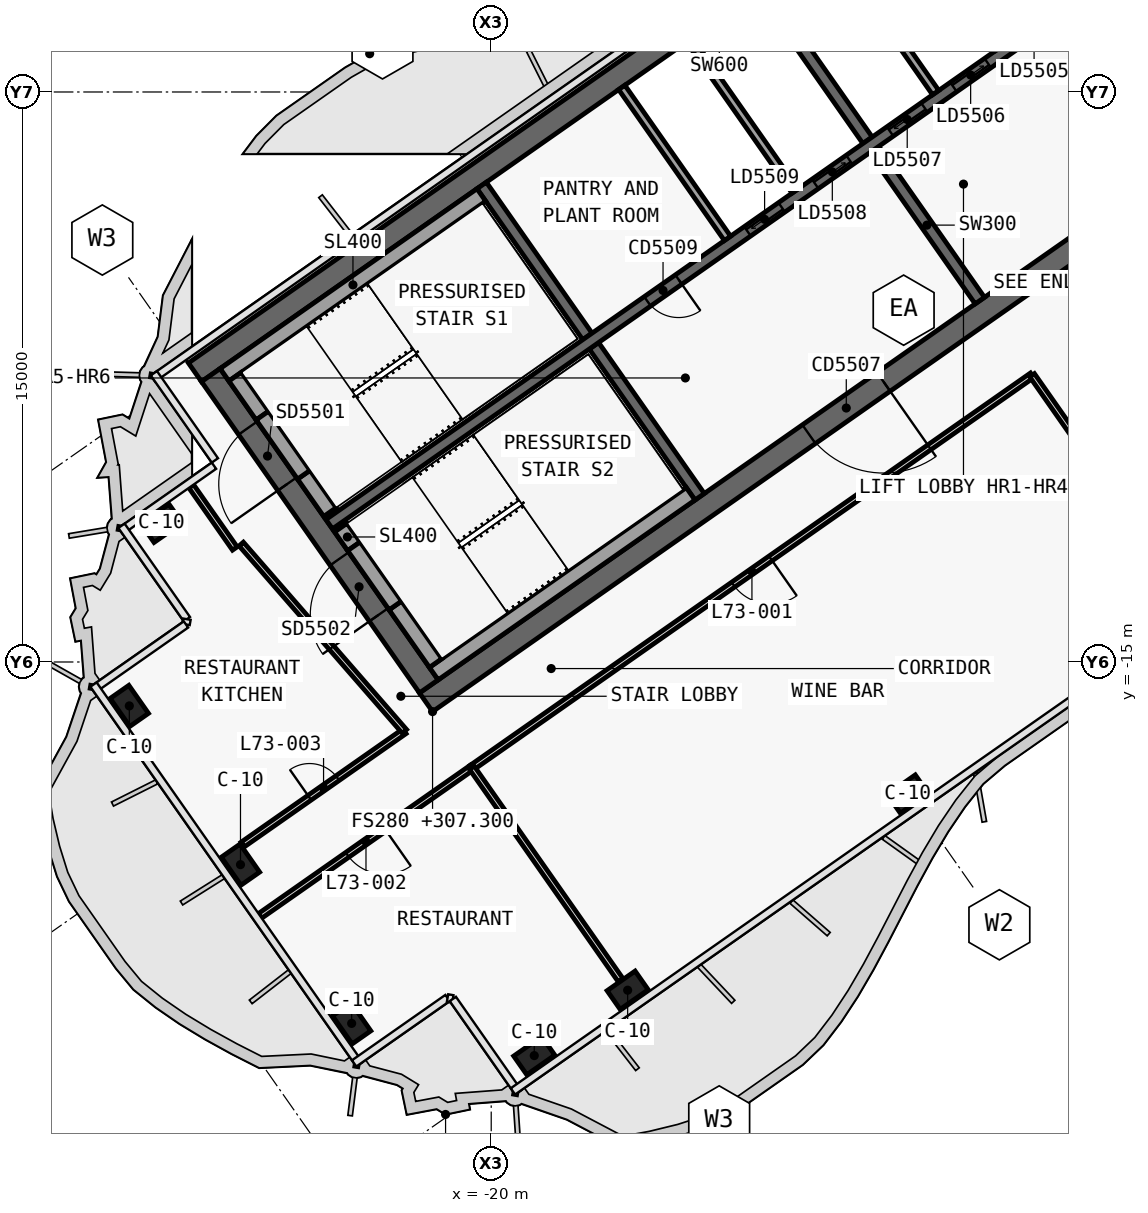
"""IFC4 building model, lengths in metres.
Left out: names, types, materials, properties, quantities, classifications, styles, units other than length and angle.
Written with IfcOpenShell. Run it as: python <this file> out.ifc"""

import sys

from ifc_helpers import new_model, si_unit, direction, frame, frame_2d, origin, origin_2d, place, context, subcontext, project, spatial, polyline, rectangle, outline, extrude, element, fill, save


model = new_model("IFC4")
c1 = context("Model", 3, precision=1e-05, world=origin(), true_north=direction((0.0, 1.0)))
c2 = subcontext(c1, "Body", "Model", "MODEL_VIEW")
j1 = project(units=[si_unit("LENGTHUNIT", "METRE"), si_unit("PLANEANGLEUNIT", "RADIAN")], contexts=[c1])
p1 = place(None, origin())
s1 = spatial("IfcSite", under=j1, at=p1, CompositionType="ELEMENT")
p2 = place(p1, origin())
s2 = spatial("IfcBuilding", under=s1, at=p2, CompositionType="ELEMENT")
p3 = place(p2, frame((0.0, 0.0, 307.3)))
s3 = spatial("IfcBuildingStorey", under=s2, at=p3, CompositionType="ELEMENT", Elevation=307.3)
p4 = place(p3, frame((-0.028, 12.066, 0.0), z_axis=(0.0, 0.0, 1.0), x_axis=(-0.819151382952, -0.573577380837, 0.0)))
e1 = element("IfcWall", 1, at=p4, inside=s3, PredefinedType="SHEAR", context=c2, shape_type="SweptSolid", body=[
    extrude(outline(polyline([(33.898, 0.3), (0.42, 0.3), (0.0, -0.3), (33.898, -0.3), (33.898, 0.3)])), origin(), (0.0, 0.0, 1.0), 6.0),
])
p5 = place(p3, frame((-0.028, -0.874, 0.0), z_axis=(0.0, 0.0, 1.0), x_axis=(-0.819150035022, -0.573579305871, 0.0)))
e2 = element("IfcWall", 2, at=p5, inside=s3, PredefinedType="SHEAR", context=c2, shape_type="SweptSolid", body=[
    extrude(outline(polyline([(26.476, 0.3), (0.42, 0.3), (0.0, -0.3), (26.476, -0.3), (26.476, 0.3)])), origin(), (0.0, 0.0, 1.0), 6.0),
])
p6 = place(p5, frame((2.976, 0.0, 0.0)))
e3 = element("IfcOpeningElement", 3, at=p6, cuts=e2, PredefinedType="OPENING", context=c2, shape_type="SweptSolid", body=[
    extrude(rectangle(XDim=2.4, YDim=2.1, at=frame_2d((1.2, 1.05))), frame((0.0, 0.31, 0.0), z_axis=(0.0, -1.0, 0.0), x_axis=(1.0, 0.0, 0.0)), (0.0, 0.0, 1.0), 0.62),
])
p7 = place(p5, frame((11.776, 0.0, 0.0)))
e4 = element("IfcOpeningElement", 4, at=p7, cuts=e2, PredefinedType="OPENING", context=c2, shape_type="SweptSolid", body=[
    extrude(rectangle(XDim=2.4, YDim=2.1, at=frame_2d((1.2, 1.05))), frame((0.0, 0.31, 0.0), z_axis=(0.0, -1.0, 0.0), x_axis=(1.0, 0.0, 0.0)), (0.0, 0.0, 1.0), 0.62),
])
p8 = place(p3, frame((-21.642, -15.642, 0.0), z_axis=(0.0, 0.0, 1.0), x_axis=(-0.573586866468, 0.819144740944, 0.0)))
e5 = element("IfcWall", 5, at=p8, inside=s3, PredefinedType="SHEAR", context=c2, shape_type="SweptSolid", body=[
    extrude(outline(polyline([(0.0, 0.3), (0.0, -0.3), (10.0, -0.3), (10.0, 0.3), (0.0, 0.3)])), origin(), (0.0, 0.0, 1.0), 6.0),
])
p9 = place(p8, frame((6.5, 0.0, 0.0)))
e6 = element("IfcOpeningElement", 6, at=p9, cuts=e5, PredefinedType="OPENING", context=c2, shape_type="SweptSolid", body=[
    extrude(rectangle(XDim=1.8, YDim=2.1, at=frame_2d((0.9, 1.05))), frame((0.0, 0.31, 0.0), z_axis=(0.0, -1.0, 0.0), x_axis=(1.0, 0.0, 0.0)), (0.0, 0.0, 1.0), 0.62),
])
p10 = place(p8, frame((2.3, 0.0, 0.0)))
e7 = element("IfcOpeningElement", 7, at=p10, cuts=e5, PredefinedType="OPENING", context=c2, shape_type="SweptSolid", body=[
    extrude(rectangle(XDim=1.8, YDim=2.1, at=frame_2d((0.9, 1.05))), frame((0.0, 0.31, 0.0), z_axis=(0.0, -1.0, 0.0), x_axis=(1.0, 0.0, 0.0)), (0.0, 0.0, 1.0), 0.62),
])
p11 = place(p3, frame((-7.143, -5.49, 0.0), z_axis=(0.0, 0.0, 1.0), x_axis=(-0.573617744349, 0.819123118565, 0.0)))
e8 = element("IfcWall", 8, at=p11, inside=s3, PredefinedType="SHEAR", context=c2, shape_type="SweptSolid", body=[
    extrude(outline(polyline([(4.85, 0.15), (0.0, 0.15), (0.0, -0.15), (4.85, -0.15), (4.85, 0.15)])), origin(), (0.0, 0.0, 1.0), 6.0),
])
p12 = place(p3, frame((-10.097, -1.271, 0.0), z_axis=(0.0, 0.0, 1.0), x_axis=(-0.573560315113, 0.819163332265, 0.0)))
e9 = element("IfcWall", 9, at=p12, inside=s3, PredefinedType="SHEAR", context=c2, shape_type="SweptSolid", body=[
    extrude(outline(polyline([(4.85, -0.15), (4.85, 0.15), (0.0, 0.15), (0.0, -0.15), (4.85, -0.15)])), origin(), (0.0, 0.0, 1.0), 6.0),
])
p13 = place(p3, frame((-14.515, -10.652, 0.0), z_axis=(0.0, 0.0, 1.0), x_axis=(-0.573560315113, 0.819163332265, 0.0)))
e10 = element("IfcWall", 10, at=p13, inside=s3, PredefinedType="SHEAR", context=c2, shape_type="SweptSolid", body=[
    extrude(outline(polyline([(4.85, 0.15), (0.0, 0.15), (0.0, -0.15), (4.85, -0.15), (4.85, 0.15)])), origin(), (0.0, 0.0, 1.0), 6.0),
])
p14 = place(p3, frame((-17.469, -6.433, 0.0), z_axis=(0.0, 0.0, 1.0), x_axis=(-0.573594092424, 0.81913968109, 0.0)))
e11 = element("IfcWall", 11, at=p14, inside=s3, PredefinedType="SHEAR", context=c2, shape_type="SweptSolid", body=[
    extrude(outline(polyline([(4.85, -0.15), (4.85, 0.15), (0.0, 0.15), (0.0, -0.15), (4.85, -0.15)])), origin(), (0.0, 0.0, 1.0), 6.0),
])
p15 = place(p3, frame((-2.638, 3.768, 0.0), z_axis=(0.0, 0.0, 1.0), x_axis=(-0.819155014212, -0.573572194837, 0.0)))
e12 = element("IfcWall", 12, at=p15, inside=s3, PredefinedType="SHEAR", context=c2, shape_type="SweptSolid", body=[
    extrude(outline(polyline([(26.4, 0.15), (0.0, 0.15), (0.0, -0.15), (26.4, -0.15), (26.4, 0.15)])), origin(), (0.0, 0.0, 1.0), 6.0),
])
p16 = place(p15, frame((1.169, 0.0, 0.0)))
e13 = element("IfcOpeningElement", 13, at=p16, cuts=e12, PredefinedType="OPENING", context=c2, shape_type="SweptSolid", body=[
    extrude(rectangle(XDim=1.1, YDim=2.1, at=frame_2d((0.55, 1.05))), frame((0.0, 0.16, 0.0), z_axis=(0.0, -1.0, 0.0), x_axis=(1.0, 0.0, 0.0)), (0.0, 0.0, 1.0), 0.32),
])
p17 = place(p15, frame((3.206, 0.0, 0.0)))
e14 = element("IfcOpeningElement", 14, at=p17, cuts=e12, PredefinedType="OPENING", context=c2, shape_type="SweptSolid", body=[
    extrude(rectangle(XDim=1.1, YDim=2.1, at=frame_2d((0.55, 1.05))), frame((0.0, 0.16, 0.0), z_axis=(0.0, -1.0, 0.0), x_axis=(1.0, 0.0, 0.0)), (0.0, 0.0, 1.0), 0.32),
])
p18 = place(p15, frame((5.244, 0.0, 0.0)))
e15 = element("IfcOpeningElement", 15, at=p18, cuts=e12, PredefinedType="OPENING", context=c2, shape_type="SweptSolid", body=[
    extrude(rectangle(XDim=1.1, YDim=2.1, at=frame_2d((0.55, 1.05))), frame((0.0, 0.16, 0.0), z_axis=(0.0, -1.0, 0.0), x_axis=(1.0, 0.0, 0.0)), (0.0, 0.0, 1.0), 0.32),
])
p19 = place(p15, frame((7.281, 0.0, 0.0)))
e16 = element("IfcOpeningElement", 16, at=p19, cuts=e12, PredefinedType="OPENING", context=c2, shape_type="SweptSolid", body=[
    extrude(rectangle(XDim=1.1, YDim=2.1, at=frame_2d((0.55, 1.05))), frame((0.0, 0.16, 0.0), z_axis=(0.0, -1.0, 0.0), x_axis=(1.0, 0.0, 0.0)), (0.0, 0.0, 1.0), 0.32),
])
p20 = place(p15, frame((9.688, 0.0, 0.0)))
e17 = element("IfcOpeningElement", 17, at=p20, cuts=e12, PredefinedType="OPENING", context=c2, shape_type="SweptSolid", body=[
    extrude(rectangle(XDim=1.1, YDim=2.1, at=frame_2d((0.55, 1.05))), frame((0.0, 0.16, 0.0), z_axis=(0.0, -1.0, 0.0), x_axis=(1.0, 0.0, 0.0)), (0.0, 0.0, 1.0), 0.32),
])
p21 = place(p15, frame((11.863, 0.0, 0.0)))
e18 = element("IfcOpeningElement", 18, at=p21, cuts=e12, PredefinedType="OPENING", context=c2, shape_type="SweptSolid", body=[
    extrude(rectangle(XDim=1.1, YDim=2.1, at=frame_2d((0.55, 1.05))), frame((0.0, 0.16, 0.0), z_axis=(0.0, -1.0, 0.0), x_axis=(1.0, 0.0, 0.0)), (0.0, 0.0, 1.0), 0.32),
])
p22 = place(p15, frame((15.175, 0.0, 0.0)))
e19 = element("IfcOpeningElement", 19, at=p22, cuts=e12, PredefinedType="OPENING", context=c2, shape_type="SweptSolid", body=[
    extrude(rectangle(XDim=1.0, YDim=2.1, at=frame_2d((0.5, 1.05))), frame((0.0, 0.16, 0.0), z_axis=(0.0, -1.0, 0.0), x_axis=(1.0, 0.0, 0.0)), (0.0, 0.0, 1.0), 0.32),
])
for number, where, z_axis, x_axis in (
    (20, (-9.038, -18.475, 0.0), (0.0, 0.0, 1.0), (-0.819, -0.574, 0.0)),
    (21, (-16.41, -23.637, 0.0), (0.0, 0.0, 1.0), (-0.819, -0.574, 0.0)),
    (22, (-18.867, -25.358, 0.0), (0.0, 0.0, 1.0), (-0.819, -0.574, 0.0)),
    (23, (-28.676, -11.35, 0.0), (0.0, 0.0, 1.0), (-0.819, -0.574, 0.0)),
    (24, (-23.672, -24.51, 0.0), (0.0, 0.0, 1.0), (-0.574, 0.819, 0.0)),
    (25, (-26.598, -20.333, 0.0), (0.0, 0.0, 1.0), (-0.574, 0.819, 0.0)),
    (26, (-29.523, -16.155, 0.0), (0.0, 0.0, 1.0), (-0.574, 0.819, 0.0)),
):
    element("IfcColumn", number, at=place(p3, frame(where, z_axis=z_axis, x_axis=x_axis)), inside=s3, PredefinedType="COLUMN", context=c2, shape_type="SweptSolid", body=[
        extrude(rectangle(XDim=0.9, YDim=0.6, at=origin_2d()), origin(), (0.0, 0.0, 1.0), 6.0),
    ])
p23 = place(p3, frame((-8.305, -0.017, 0.0), z_axis=(0.0, 0.0, 1.0), x_axis=(-0.573594092424, 0.81913968109, 0.0)))
e27 = element("IfcWall", 27, at=p23, inside=s3, PredefinedType="SOLIDWALL", context=c2, shape_type="SweptSolid", body=[
    extrude(rectangle(XDim=4.85, YDim=0.2, at=frame_2d((2.425, 0.0))), origin(), (0.0, 0.0, 1.0), 6.0),
])
p24 = place(p3, frame((-12.001, -2.605, 0.0), z_axis=(0.0, 0.0, 1.0), x_axis=(-0.573560315113, 0.819163332265, 0.0)))
e28 = element("IfcWall", 28, at=p24, inside=s3, PredefinedType="SOLIDWALL", context=c2, shape_type="SweptSolid", body=[
    extrude(rectangle(XDim=4.85, YDim=0.2, at=frame_2d((2.425, 0.0))), origin(), (0.0, 0.0, 1.0), 6.0),
])
p25 = place(p3, frame((-13.783, -3.852, 0.0), z_axis=(0.0, 0.0, 1.0), x_axis=(-0.573594092424, 0.81913968109, 0.0)))
e29 = element("IfcWall", 29, at=p25, inside=s3, PredefinedType="SOLIDWALL", context=c2, shape_type="SweptSolid", body=[
    extrude(rectangle(XDim=4.85, YDim=0.2, at=frame_2d((2.425, 0.0))), origin(), (0.0, 0.0, 1.0), 6.0),
])
p26 = place(p3, frame((-20.259, -2.71, 0.0), z_axis=(0.0, 0.0, 1.0), x_axis=(-0.81914849389, -0.573581506813, 0.0)))
e30 = element("IfcWall", 30, at=p26, inside=s3, PredefinedType="SOLIDWALL", context=c2, shape_type="SweptSolid", body=[
    extrude(rectangle(XDim=8.25, YDim=0.4, at=frame_2d((4.125, 0.0))), origin(), (0.0, 0.0, 1.0), 5.72),
])
p27 = place(p3, frame((-24.244, -11.055, 0.0), z_axis=(0.0, 0.0, 1.0), x_axis=(-0.573571582932, 0.819155442668, 0.0)))
e31 = element("IfcWall", 31, at=p27, inside=s3, PredefinedType="SOLIDWALL", context=c2, shape_type="SweptSolid", body=[
    extrude(rectangle(XDim=1.2, YDim=0.4, at=frame_2d((0.6, 0.0))), origin(), (0.0, 0.0, 1.0), 5.72),
])
p28 = place(p3, frame((-26.022, -8.515, 0.0), z_axis=(0.0, 0.0, 1.0), x_axis=(-0.573619628835, 0.819121798889, 0.0)))
e32 = element("IfcWall", 32, at=p28, inside=s3, PredefinedType="SOLIDWALL", context=c2, shape_type="SweptSolid", body=[
    extrude(rectangle(XDim=1.25, YDim=0.4, at=frame_2d((0.625, 0.0))), origin(), (0.0, 0.0, 1.0), 5.72),
])
p29 = place(p3, frame((-24.932, -10.072, 2.15), z_axis=(0.0, 0.0, 1.0), x_axis=(-0.573591692345, 0.819141361715, 0.0)))
e33 = element("IfcWall", 33, at=p29, inside=s3, PredefinedType="SOLIDWALL", context=c2, shape_type="SweptSolid", body=[
    extrude(rectangle(XDim=1.9, YDim=0.4, at=frame_2d((0.95, 0.0))), origin(), (0.0, 0.0, 1.0), 3.57),
])
p30 = place(p3, frame((-14.753, -10.574, 0.0), z_axis=(0.0, 0.0, 1.0), x_axis=(-0.819158229677, -0.573567602601, 0.0)))
e34 = element("IfcWall", 34, at=p30, inside=s3, PredefinedType="SOLIDWALL", context=c2, shape_type="SweptSolid", body=[
    extrude(rectangle(XDim=8.25, YDim=0.4, at=frame_2d((4.125, 0.0))), origin(), (0.0, 0.0, 1.0), 5.72),
])
p31 = place(p3, frame((-21.462, -15.028, 0.0), z_axis=(0.0, 0.0, 1.0), x_axis=(-0.573559770908, 0.819163713305, 0.0)))
e35 = element("IfcWall", 35, at=p31, inside=s3, PredefinedType="SOLIDWALL", context=c2, shape_type="SweptSolid", body=[
    extrude(rectangle(XDim=1.85, YDim=0.4, at=frame_2d((0.925, 0.0))), origin(), (0.0, 0.0, 1.0), 5.72),
])
p32 = place(p3, frame((-23.613, -11.956, 0.0), z_axis=(0.0, 0.0, 1.0), x_axis=(-0.573435029941, 0.819251039936, 0.0)))
e36 = element("IfcWall", 36, at=p32, inside=s3, PredefinedType="SOLIDWALL", context=c2, shape_type="SweptSolid", body=[
    extrude(rectangle(XDim=0.6, YDim=0.4, at=frame_2d((0.3, 0.0))), origin(), (0.0, 0.0, 1.0), 5.72),
])
p33 = place(p3, frame((-22.523, -13.512, 2.15), z_axis=(0.0, 0.0, 1.0), x_axis=(-0.573591692345, 0.819141361715, 0.0)))
e37 = element("IfcWall", 37, at=p33, inside=s3, PredefinedType="SOLIDWALL", context=c2, shape_type="SweptSolid", body=[
    extrude(rectangle(XDim=1.9, YDim=0.4, at=frame_2d((0.95, 0.0))), origin(), (0.0, 0.0, 1.0), 3.57),
])
p34 = place(p3, frame((-26.54, -19.804, 0.0), z_axis=(0.0, 0.0, 1.0), x_axis=(0.819163496387, 0.573560080713, 0.0)))
e38 = element("IfcWall", 38, at=p34, inside=s3, PredefinedType="PARTITIONING", context=c2, shape_type="SweptSolid", body=[
    extrude(rectangle(XDim=5.197, YDim=0.15, at=frame_2d((2.598, 0.0))), origin(), (0.0, 0.0, 1.0), 5.15),
])
p35 = place(p34, frame((2.148, 0.0, 0.0)))
e39 = element("IfcOpeningElement", 39, at=p35, cuts=e38, PredefinedType="OPENING", context=c2, shape_type="SweptSolid", body=[
    extrude(rectangle(XDim=0.9, YDim=2.1, at=frame_2d((0.45, 1.05))), frame((0.0, 0.085, 0.0), z_axis=(0.0, -1.0, 0.0), x_axis=(1.0, 0.0, 0.0)), (0.0, 0.0, 1.0), 0.17),
])
p36 = place(p3, frame((-5.766, -7.456, 0.0), z_axis=(0.0, 0.0, 1.0), x_axis=(-0.819153544995, -0.573574293115, 0.0)))
e40 = element("IfcWall", 40, at=p36, inside=s3, PredefinedType="PARTITIONING", context=c2, shape_type="SweptSolid", body=[
    extrude(rectangle(XDim=18.002, YDim=0.15, at=frame_2d((9.001, 0.0))), origin(), (0.0, 0.0, 1.0), 5.15),
])
p37 = place(p36, frame((8.401, 0.0, 0.0)))
e41 = element("IfcOpeningElement", 41, at=p37, cuts=e40, PredefinedType="OPENING", context=c2, shape_type="SweptSolid", body=[
    extrude(rectangle(XDim=1.2, YDim=2.4, at=frame_2d((0.6, 1.2))), frame((0.0, 0.085, 0.0), z_axis=(0.0, -1.0, 0.0), x_axis=(1.0, 0.0, 0.0)), (0.0, 0.0, 1.0), 0.17),
])
p38 = place(p3, frame((-20.51, -17.779, 0.0), z_axis=(0.0, 0.0, 1.0), x_axis=(-0.819154345195, -0.573573150303, 0.0)))
e42 = element("IfcWall", 42, at=p38, inside=s3, PredefinedType="PARTITIONING", context=c2, shape_type="SweptSolid", body=[
    extrude(rectangle(XDim=6.802, YDim=0.15, at=frame_2d((3.401, 0.0))), origin(), (0.0, 0.0, 1.0), 5.1),
])
p39 = place(p38, frame((2.801, 0.0, 0.0)))
e43 = element("IfcOpeningElement", 43, at=p39, cuts=e42, PredefinedType="OPENING", context=c2, shape_type="SweptSolid", body=[
    extrude(rectangle(XDim=1.2, YDim=2.4, at=frame_2d((0.6, 1.2))), frame((0.0, 0.085, 0.0), z_axis=(0.0, -1.0, 0.0), x_axis=(1.0, 0.0, 0.0)), (0.0, 0.0, 1.0), 0.17),
])
p40 = place(p3, frame((-1.849, -13.051, 0.0), z_axis=(0.0, 0.0, 1.0), x_axis=(-0.57357985571, 0.819149650018, 0.0)))
e44 = element("IfcWall", 44, at=p40, inside=s3, PredefinedType="PARTITIONING", context=c2, shape_type="SweptSolid", body=[
    extrude(rectangle(XDim=6.832, YDim=0.15, at=frame_2d((3.416, 0.0))), origin(), (0.0, 0.0, 1.0), 5.15),
])
p41 = place(p3, frame((-26.746, -12.014, 0.0), z_axis=(0.0, 0.0, 1.0), x_axis=(-0.573568836472, 0.819157365729, 0.0)))
e45 = element("IfcWall", 45, at=p41, inside=s3, PredefinedType="PARTITIONING", context=c2, shape_type="SweptSolid", body=[
    extrude(rectangle(XDim=2.0, YDim=0.15, at=frame_2d((1.0, 0.0))), origin(), (0.0, 0.0, 1.0), 5.15),
])
p42 = place(p3, frame((-22.284, -16.826, 0.0), z_axis=(0.0, 0.0, 1.0), x_axis=(-0.656758142177, 0.754101281449, 0.0)))
e46 = element("IfcWall", 46, at=p42, inside=s3, PredefinedType="PARTITIONING", context=c2, shape_type="SweptSolid", body=[
    extrude(rectangle(XDim=6.539, YDim=0.15, at=frame_2d((3.269, 0.0))), origin(), (0.0, 0.0, 1.0), 5.72),
])
p43 = place(p3, frame((-16.594, -23.375, 0.0), z_axis=(0.0, 0.0, 1.0), x_axis=(-0.573577493031, 0.819151304393, 0.0)))
e47 = element("IfcWall", 47, at=p43, inside=s3, PredefinedType="PARTITIONING", context=c2, shape_type="SweptSolid", body=[
    extrude(rectangle(XDim=6.83, YDim=0.15, at=frame_2d((3.415, 0.0))), origin(), (0.0, 0.0, 1.0), 5.15),
])
p44 = place(p18, origin())
e48 = element("IfcDoor", 48, at=p44, inside=s3, OperationType="SLIDING_TO_LEFT", PredefinedType="DOOR", context=c2, shape_type="SweptSolid", body=[
    extrude(rectangle(XDim=1.1, YDim=2.1, at=frame_2d((0.55, 1.05))), frame((0.0, 0.025, 0.0), z_axis=(0.0, -1.0, 0.0), x_axis=(1.0, 0.0, 0.0)), (0.0, 0.0, 1.0), 0.05),
])
fill(e15, e48)
p45 = place(p19, origin())
e49 = element("IfcDoor", 49, at=p45, inside=s3, OperationType="SLIDING_TO_RIGHT", PredefinedType="DOOR", context=c2, shape_type="SweptSolid", body=[
    extrude(rectangle(XDim=1.1, YDim=2.1, at=frame_2d((0.55, 1.05))), frame((0.0, 0.025, 0.0), z_axis=(0.0, -1.0, 0.0), x_axis=(1.0, 0.0, 0.0)), (0.0, 0.0, 1.0), 0.05),
])
fill(e16, e49)
p46 = place(p20, origin())
e50 = element("IfcDoor", 50, at=p46, inside=s3, OperationType="SLIDING_TO_LEFT", PredefinedType="DOOR", context=c2, shape_type="SweptSolid", body=[
    extrude(rectangle(XDim=1.1, YDim=2.1, at=frame_2d((0.55, 1.05))), frame((0.0, 0.025, 0.0), z_axis=(0.0, -1.0, 0.0), x_axis=(1.0, 0.0, 0.0)), (0.0, 0.0, 1.0), 0.05),
])
fill(e17, e50)
p47 = place(p21, origin())
e51 = element("IfcDoor", 51, at=p47, inside=s3, OperationType="SLIDING_TO_RIGHT", PredefinedType="DOOR", context=c2, shape_type="SweptSolid", body=[
    extrude(rectangle(XDim=1.1, YDim=2.1, at=frame_2d((0.55, 1.05))), frame((0.0, 0.025, 0.0), z_axis=(0.0, -1.0, 0.0), x_axis=(1.0, 0.0, 0.0)), (0.0, 0.0, 1.0), 0.05),
])
fill(e18, e51)
p48 = place(p22, origin())
e52 = element("IfcDoor", 52, at=p48, inside=s3, OperationType="SINGLE_SWING_RIGHT", PredefinedType="DOOR", context=c2, shape_type="SweptSolid", body=[
    extrude(rectangle(XDim=1.0, YDim=2.1, at=frame_2d((0.5, 1.05))), frame((0.0, 0.025, 0.0), z_axis=(0.0, -1.0, 0.0), x_axis=(1.0, 0.0, 0.0)), (0.0, 0.0, 1.0), 0.05),
])
fill(e19, e52)
p49 = place(p7, origin())
e53 = element("IfcDoor", 53, at=p49, inside=s3, OperationType="DOUBLE_DOOR_SINGLE_SWING", PredefinedType="DOOR", context=c2, shape_type="SweptSolid", body=[
    extrude(rectangle(XDim=2.4, YDim=2.1, at=frame_2d((1.2, 1.05))), frame((0.0, 0.025, 0.0), z_axis=(0.0, -1.0, 0.0), x_axis=(1.0, 0.0, 0.0)), (0.0, 0.0, 1.0), 0.05),
])
fill(e4, e53)
p50 = place(p9, origin())
e54 = element("IfcDoor", 54, at=p50, inside=s3, OperationType="DOUBLE_DOOR_SINGLE_SWING", PredefinedType="DOOR", context=c2, shape_type="SweptSolid", body=[
    extrude(rectangle(XDim=1.8, YDim=2.1, at=frame_2d((0.9, 1.05))), frame((0.0, 0.025, 0.0), z_axis=(0.0, -1.0, 0.0), x_axis=(1.0, 0.0, 0.0)), (0.0, 0.0, 1.0), 0.05),
])
fill(e6, e54)
p51 = place(p10, origin())
e55 = element("IfcDoor", 55, at=p51, inside=s3, OperationType="DOUBLE_DOOR_SINGLE_SWING", PredefinedType="DOOR", context=c2, shape_type="SweptSolid", body=[
    extrude(rectangle(XDim=1.8, YDim=2.1, at=frame_2d((0.9, 1.05))), frame((0.0, 0.025, 0.0), z_axis=(0.0, -1.0, 0.0), x_axis=(1.0, 0.0, 0.0)), (0.0, 0.0, 1.0), 0.05),
])
fill(e7, e55)
p52 = place(p37, origin())
e56 = element("IfcDoor", 56, at=p52, inside=s3, OperationType="DOUBLE_DOOR_SINGLE_SWING", PredefinedType="DOOR", context=c2, shape_type="SweptSolid", body=[
    extrude(rectangle(XDim=1.2, YDim=2.4, at=frame_2d((0.6, 1.2))), frame((0.0, 0.025, 0.0), z_axis=(0.0, -1.0, 0.0), x_axis=(1.0, 0.0, 0.0)), (0.0, 0.0, 1.0), 0.05),
])
fill(e41, e56)
p53 = place(p39, origin())
e57 = element("IfcDoor", 57, at=p53, inside=s3, OperationType="DOUBLE_DOOR_SINGLE_SWING", PredefinedType="DOOR", context=c2, shape_type="SweptSolid", body=[
    extrude(rectangle(XDim=1.2, YDim=2.4, at=frame_2d((0.6, 1.2))), frame((0.0, 0.025, 0.0), z_axis=(0.0, -1.0, 0.0), x_axis=(1.0, 0.0, 0.0)), (0.0, 0.0, 1.0), 0.05),
])
fill(e43, e57)
p54 = place(p35, origin())
e58 = element("IfcDoor", 58, at=p54, inside=s3, OperationType="SINGLE_SWING_LEFT", PredefinedType="DOOR", context=c2, shape_type="SweptSolid", body=[
    extrude(rectangle(XDim=0.9, YDim=2.1, at=frame_2d((0.45, 1.05))), frame((0.0, 0.025, 0.0), z_axis=(0.0, -1.0, 0.0), x_axis=(1.0, 0.0, 0.0)), (0.0, 0.0, 1.0), 0.05),
])
fill(e39, e58)
save(model, sys.argv[1])
